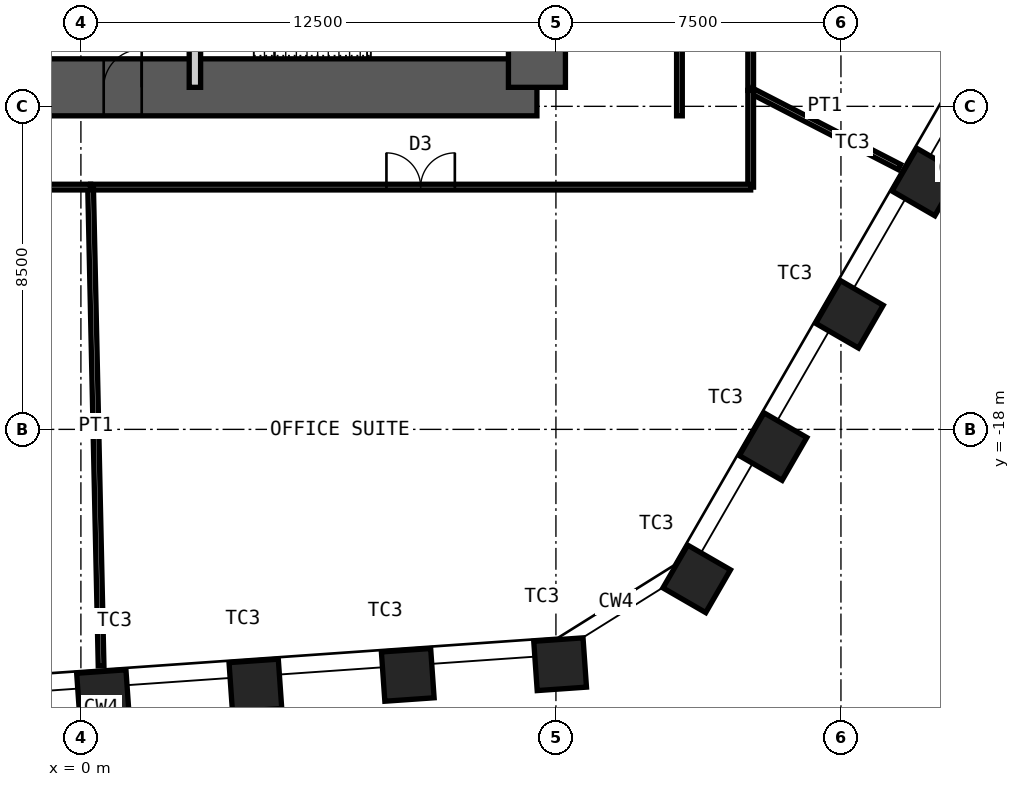
"""IFC4 building model, lengths in metres.
Left out: names, types, materials, properties, quantities, classifications, styles, units other than length and angle.
Written with IfcOpenShell. Run it as: python <this file> out.ifc"""

import sys

from ifc_helpers import new_model, si_unit, direction, frame, frame_2d, origin, origin_2d, place, context, subcontext, project, spatial, rectangle, hollow_rectangle, extrude, element, fill, save


model = new_model("IFC4")
c1 = context("Model", 3, precision=1e-05, world=origin(), true_north=direction((0.0, 1.0)))
c2 = subcontext(c1, "Body", "Model", "MODEL_VIEW")
j1 = project(units=[si_unit("LENGTHUNIT", "METRE"), si_unit("PLANEANGLEUNIT", "RADIAN")], contexts=[c1])
p1 = place(None, origin())
s1 = spatial("IfcSite", under=j1, at=p1, CompositionType="ELEMENT")
p2 = place(p1, origin())
s2 = spatial("IfcBuilding", under=s1, at=p2, CompositionType="ELEMENT")
p3 = place(p2, frame((0.0, 0.0, 136.6)))
s3 = spatial("IfcBuildingStorey", under=s2, at=p3, CompositionType="ELEMENT", Elevation=136.6)
for number, where, z_axis, x_axis in (
    (1, (22.233, -11.491, 0.0), (0.0, 0.0, 1.0), (0.5, 0.866, 0.0)),
    (2, (20.223, -14.972, 0.0), (0.0, 0.0, 1.0), (0.5, 0.866, 0.0)),
    (3, (18.214, -18.453, 0.0), (0.0, 0.0, 1.0), (0.5, 0.866, 0.0)),
    (4, (16.204, -21.933, 0.0), (0.0, 0.0, 1.0), (0.5, 0.866, 0.0)),
    (5, (12.61, -24.179, 0.0), (0.0, 0.0, 1.0), (0.998, 0.07, 0.0)),
    (6, (8.601, -24.46, 0.0), (0.0, 0.0, 1.0), (0.998, 0.07, 0.0)),
    (7, (4.592, -24.74, 0.0), (0.0, 0.0, 1.0), (0.998, 0.07, 0.0)),
    (8, (0.582, -25.02, 0.0), (0.0, 0.0, 1.0), (0.998, 0.07, 0.0)),
):
    element("IfcColumn", number, at=place(p3, frame(where, z_axis=z_axis, x_axis=x_axis)), inside=s3, PredefinedType="COLUMN", context=c2, shape_type="SweptSolid", body=[
        extrude(hollow_rectangle(XDim=1.3, YDim=1.3, WallThickness=0.1, at=origin_2d()), origin(), (0.0, 0.0, 1.0), 4.2),
    ])
p4 = place(p3, frame((-12.0, -9.0, 0.0), z_axis=(0.0, 0.0, 1.0), x_axis=(1.0, 0.0, 0.0)))
e9 = element("IfcWall", 9, at=p4, inside=s3, PredefinedType="SHEAR", context=c2, shape_type="SweptSolid", body=[
    extrude(rectangle(XDim=24.0, YDim=1.5, at=frame_2d((12.0, 0.0))), origin(), (0.0, 0.0, 1.0), 4.2),
])
p5 = place(p4, frame((1.35, 0.0, 0.0)))
e10 = element("IfcOpeningElement", 10, at=p5, cuts=e9, PredefinedType="OPENING", context=c2, shape_type="SweptSolid", body=[
    extrude(rectangle(XDim=1.0, YDim=2.1, at=frame_2d((0.5, 1.05))), frame((0.0, 0.76, 0.0), z_axis=(0.0, -1.0, 0.0), x_axis=(1.0, 0.0, 0.0)), (0.0, 0.0, 1.0), 1.52),
])
p6 = place(p4, frame((5.325, 0.0, 0.0)))
e11 = element("IfcOpeningElement", 11, at=p6, cuts=e9, PredefinedType="OPENING", context=c2, shape_type="SweptSolid", body=[
    extrude(rectangle(XDim=1.15, YDim=2.1, at=frame_2d((0.575, 1.05))), frame((0.0, 0.76, 0.0), z_axis=(0.0, -1.0, 0.0), x_axis=(1.0, 0.0, 0.0)), (0.0, 0.0, 1.0), 1.52),
])
p7 = place(p4, frame((12.6, 0.0, 0.0)))
e12 = element("IfcOpeningElement", 12, at=p7, cuts=e9, PredefinedType="OPENING", context=c2, shape_type="SweptSolid", body=[
    extrude(rectangle(XDim=1.0, YDim=2.1, at=frame_2d((0.5, 1.05))), frame((0.0, 0.76, 0.0), z_axis=(0.0, -1.0, 0.0), x_axis=(1.0, 0.0, 0.0)), (0.0, 0.0, 1.0), 1.52),
])
p8 = place(p3, frame((12.0, -9.0, 0.0), z_axis=(0.0, 0.0, 1.0), x_axis=(0.0, 1.0, 0.0)))
e13 = element("IfcWall", 13, at=p8, inside=s3, PredefinedType="SHEAR", context=c2, shape_type="SweptSolid", body=[
    extrude(rectangle(XDim=18.0, YDim=1.5, at=frame_2d((9.0, 0.0))), origin(), (0.0, 0.0, 1.0), 4.2),
])
p9 = place(p8, frame((8.1, 0.0, 0.0)))
e14 = element("IfcOpeningElement", 14, at=p9, cuts=e13, PredefinedType="OPENING", context=c2, shape_type="SweptSolid", body=[
    extrude(rectangle(XDim=1.8, YDim=2.1, at=frame_2d((0.9, 1.05))), frame((0.0, 0.76, 0.0), z_axis=(0.0, -1.0, 0.0), x_axis=(1.0, 0.0, 0.0)), (0.0, 0.0, 1.0), 1.52),
])
p10 = place(p3, frame((3.0, -9.0, 0.0), z_axis=(0.0, 0.0, 1.0), x_axis=(0.0, 1.0, 0.0)))
e15 = element("IfcWall", 15, at=p10, inside=s3, PredefinedType="PARTITIONING", context=c2, shape_type="SweptSolid", body=[
    extrude(rectangle(XDim=3.85, YDim=0.3, at=frame_2d((1.925, 0.0))), origin(), (0.0, 0.0, 1.0), 3.98),
])
p11 = place(p10, frame((1.425, 0.0, 0.0)))
e16 = element("IfcOpeningElement", 16, at=p11, cuts=e15, PredefinedType="OPENING", context=c2, shape_type="SweptSolid", body=[
    extrude(rectangle(XDim=1.0, YDim=2.1, at=frame_2d((0.5, 1.05))), frame((0.0, 0.16, 0.0), z_axis=(0.0, -1.0, 0.0), x_axis=(1.0, 0.0, 0.0)), (0.0, 0.0, 1.0), 0.32),
])
p12 = place(p3, frame((17.625, 10.698, 0.0), z_axis=(0.0, 0.0, 1.0), x_axis=(0.0, -1.0, 0.0)))
e17 = element("IfcWall", 17, at=p12, inside=s3, PredefinedType="PARTITIONING", context=c2, shape_type="SweptSolid", body=[
    extrude(rectangle(XDim=19.778, YDim=0.15, at=frame_2d((9.889, 0.0))), origin(), (0.0, 0.0, 1.0), 4.03),
])
p13 = place(p12, frame((8.989, 0.0, 0.0)))
e18 = element("IfcOpeningElement", 18, at=p13, cuts=e17, PredefinedType="OPENING", context=c2, shape_type="SweptSolid", body=[
    extrude(rectangle(XDim=1.8, YDim=2.4, at=frame_2d((0.9, 1.2))), frame((0.0, 0.085, 0.0), z_axis=(0.0, -1.0, 0.0), x_axis=(1.0, 0.0, 0.0)), (0.0, 0.0, 1.0), 0.17),
])
p14 = place(p3, frame((21.538, -11.096, 0.0), z_axis=(0.0, 0.0, 1.0), x_axis=(-0.888982083501, 0.457941977999, 0.0)))
e19 = element("IfcWall", 19, at=p14, inside=s3, PredefinedType="PARTITIONING", context=c2, shape_type="SweptSolid", body=[
    extrude(rectangle(XDim=4.401, YDim=0.15, at=frame_2d((2.201, 0.0))), origin(), (0.0, 0.0, 1.0), 3.33),
])
p15 = place(p3, frame((17.625, -9.08, 0.0), z_axis=(0.0, 0.0, 1.0), x_axis=(0.0, -1.0, 0.0)))
e20 = element("IfcWall", 20, at=p15, inside=s3, PredefinedType="PARTITIONING", context=c2, shape_type="SweptSolid", body=[
    extrude(rectangle(XDim=2.545, YDim=0.15, at=frame_2d((1.272, 0.0))), origin(), (0.0, 0.0, 1.0), 4.03),
])
p16 = place(p3, frame((17.625, -11.625, 0.0), z_axis=(0.0, 0.0, 1.0), x_axis=(-1.0, 0.0, 0.0)))
e21 = element("IfcWall", 21, at=p16, inside=s3, PredefinedType="PARTITIONING", context=c2, shape_type="SweptSolid", body=[
    extrude(rectangle(XDim=17.37, YDim=0.15, at=frame_2d((8.685, 0.0))), origin(), (0.0, 0.0, 1.0), 4.03),
])
p17 = place(p16, frame((7.785, 0.0, 0.0)))
e22 = element("IfcOpeningElement", 22, at=p17, cuts=e21, PredefinedType="OPENING", context=c2, shape_type="SweptSolid", body=[
    extrude(rectangle(XDim=1.8, YDim=2.4, at=frame_2d((0.9, 1.2))), frame((0.0, 0.085, 0.0), z_axis=(0.0, -1.0, 0.0), x_axis=(1.0, 0.0, 0.0)), (0.0, 0.0, 1.0), 0.17),
])
p18 = place(p3, frame((0.531, -24.222, 0.0), z_axis=(0.0, 0.0, 1.0), x_axis=(-0.021933557026, 0.999759430601, 0.0)))
e23 = element("IfcWall", 23, at=p18, inside=s3, PredefinedType="PARTITIONING", context=c2, shape_type="SweptSolid", body=[
    extrude(rectangle(XDim=12.6, YDim=0.15, at=frame_2d((6.3, 0.0))), origin(), (0.0, 0.0, 1.0), 3.33),
])
p19 = place(p3, frame((0.255, -11.625, 0.0), z_axis=(0.0, 0.0, 1.0), x_axis=(-1.0, 0.0, 0.0)))
e24 = element("IfcWall", 24, at=p19, inside=s3, PredefinedType="PARTITIONING", context=c2, shape_type="SweptSolid", body=[
    extrude(rectangle(XDim=18.332, YDim=0.15, at=frame_2d((9.166, 0.0))), origin(), (0.0, 0.0, 1.0), 4.03),
])
p20 = place(p19, frame((8.266, 0.0, 0.0)))
e25 = element("IfcOpeningElement", 25, at=p20, cuts=e24, PredefinedType="OPENING", context=c2, shape_type="SweptSolid", body=[
    extrude(rectangle(XDim=1.8, YDim=2.4, at=frame_2d((0.9, 1.2))), frame((0.0, 0.085, 0.0), z_axis=(0.0, -1.0, 0.0), x_axis=(1.0, 0.0, 0.0)), (0.0, 0.0, 1.0), 0.17),
])
p21 = place(p3, frame((15.75, -9.75, 0.0), z_axis=(0.0, 0.0, 1.0), x_axis=(0.0, 1.0, 0.0)))
e26 = element("IfcWall", 26, at=p21, inside=s3, PredefinedType="PARTITIONING", context=c2, shape_type="SweptSolid", body=[
    extrude(rectangle(XDim=7.25, YDim=0.15, at=frame_2d((3.625, 0.0))), origin(), (0.0, 0.0, 1.0), 4.03),
])
p22 = place(p7, origin())
e27 = element("IfcDoor", 27, at=p22, inside=s3, OperationType="SINGLE_SWING_LEFT", PredefinedType="DOOR", context=c2, shape_type="SweptSolid", body=[
    extrude(rectangle(XDim=1.0, YDim=2.1, at=frame_2d((0.5, 1.05))), frame((0.0, 0.025, 0.0), z_axis=(0.0, -1.0, 0.0), x_axis=(1.0, 0.0, 0.0)), (0.0, 0.0, 1.0), 0.05),
])
fill(e12, e27)
p23 = place(p17, origin())
e28 = element("IfcDoor", 28, at=p23, inside=s3, OperationType="DOUBLE_DOOR_DOUBLE_SWING", PredefinedType="DOOR", context=c2, shape_type="SweptSolid", body=[
    extrude(rectangle(XDim=1.8, YDim=2.4, at=frame_2d((0.9, 1.2))), frame((0.0, 0.025, 0.0), z_axis=(0.0, -1.0, 0.0), x_axis=(1.0, 0.0, 0.0)), (0.0, 0.0, 1.0), 0.05),
])
fill(e22, e28)
save(model, sys.argv[1])
